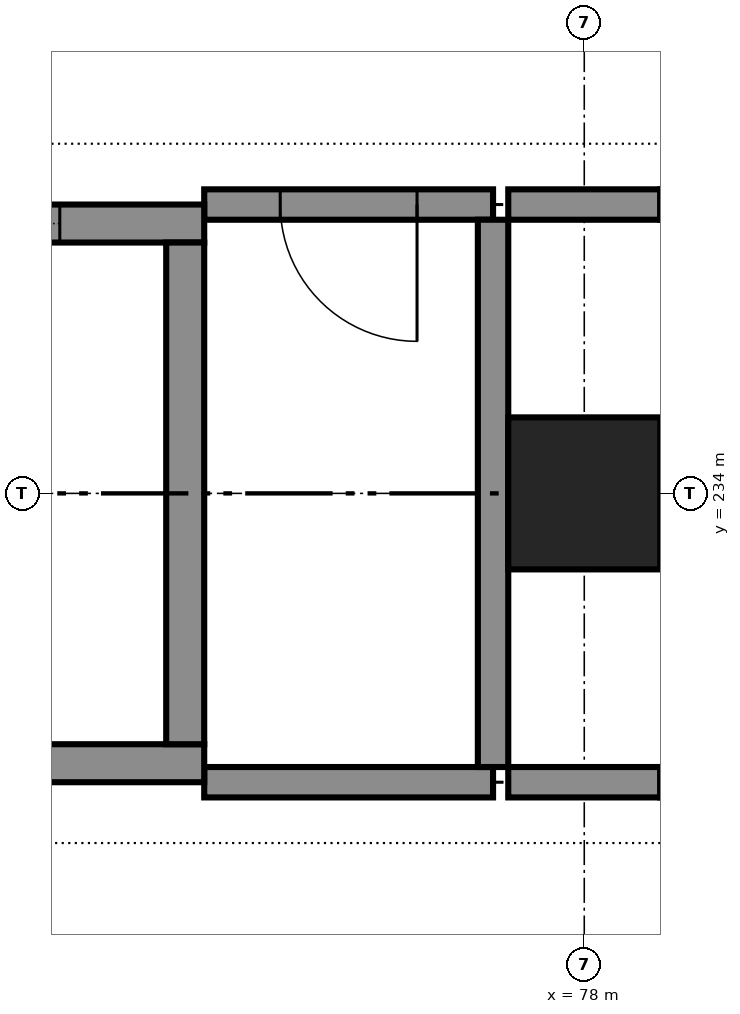
"""IFC4 building model, lengths in metres.
Left out: names, types, materials, properties, quantities, classifications, styles, units other than length and angle.
Written with IfcOpenShell. Run it as: python <this file> out.ifc"""

import sys

from ifc_helpers import new_model, si_unit, direction, frame, frame_2d, origin, origin_2d, place, context, subcontext, project, spatial, rectangle, extrude, element, fill, save


model = new_model("IFC4")
c1 = context("Model", 3, precision=1e-05, world=origin(), true_north=direction((0.0, 1.0)))
c2 = subcontext(c1, "Body", "Model", "MODEL_VIEW")
j1 = project(units=[si_unit("LENGTHUNIT", "METRE"), si_unit("PLANEANGLEUNIT", "RADIAN")], contexts=[c1])
p1 = place(None, origin())
s1 = spatial("IfcSite", under=j1, at=p1, CompositionType="ELEMENT")
p2 = place(p1, origin())
s2 = spatial("IfcBuilding", under=s1, at=p2, CompositionType="ELEMENT")
p3 = place(p2, frame((0.0, 0.0, 17.0)))
s3 = spatial("IfcBuildingStorey", under=s2, at=p3, CompositionType="ELEMENT", Elevation=17.0)
p4 = place(p3, frame((78.0, 234.0, 0.0), z_axis=(0.0, 0.0, 1.0), x_axis=(1.0, 0.0, 0.0)))
e1 = element("IfcColumn", 1, at=p4, inside=s3, PredefinedType="COLUMN", context=c2, shape_type="SweptSolid", body=[
    extrude(rectangle(XDim=1.0, YDim=1.0, at=origin_2d()), origin(), (0.0, 0.0, 1.0), 4.0),
])
p5 = place(p3, frame((72.5, 232.225, 0.0), z_axis=(0.0, 0.0, 1.0), x_axis=(1.0, 0.0, 0.0)))
e2 = element("IfcWall", 2, at=p5, inside=s3, PredefinedType="SHEAR", context=c2, shape_type="SweptSolid", body=[
    extrude(rectangle(XDim=3.0, YDim=0.25, at=frame_2d((1.5, 0.0))), origin(), (0.0, 0.0, 1.0), 4.0),
])
p6 = place(p3, frame((72.5, 235.775, 0.0), z_axis=(0.0, 0.0, 1.0), x_axis=(1.0, 0.0, 0.0)))
e3 = element("IfcWall", 3, at=p6, inside=s3, PredefinedType="SHEAR", context=c2, shape_type="SweptSolid", body=[
    extrude(rectangle(XDim=3.0, YDim=0.25, at=frame_2d((1.5, 0.0))), origin(), (0.0, 0.0, 1.0), 4.0),
])
p7 = place(p6, frame((0.95, 0.0, 0.0)))
e4 = element("IfcOpeningElement", 4, at=p7, cuts=e3, PredefinedType="OPENING", context=c2, shape_type="SweptSolid", body=[
    extrude(rectangle(XDim=1.1, YDim=2.1, at=frame_2d((0.55, 1.05))), frame((0.0, 0.135, 0.0), z_axis=(0.0, -1.0, 0.0), x_axis=(1.0, 0.0, 0.0)), (0.0, 0.0, 1.0), 0.27),
])
p8 = place(p3, frame((75.375, 232.35, 0.0), z_axis=(0.0, 0.0, 1.0), x_axis=(0.0, 1.0, 0.0)))
e5 = element("IfcWall", 5, at=p8, inside=s3, PredefinedType="SHEAR", context=c2, shape_type="SweptSolid", body=[
    extrude(rectangle(XDim=3.3, YDim=0.25, at=frame_2d((1.65, 0.0))), origin(), (0.0, 0.0, 1.0), 4.0),
])
p9 = place(p3, frame((75.5, 232.1, 0.0), z_axis=(0.0, 0.0, 1.0), x_axis=(1.0, 0.0, 0.0)))
e6 = element("IfcWall", 6, at=p9, inside=s3, PredefinedType="PARTITIONING", context=c2, shape_type="SweptSolid", body=[
    extrude(rectangle(XDim=1.9, YDim=0.2, at=frame_2d((0.95, 0.0))), origin(), (0.0, 0.0, 1.0), 3.8),
])
p10 = place(p3, frame((77.5, 232.1, 0.0), z_axis=(0.0, 0.0, 1.0), x_axis=(1.0, 0.0, 0.0)))
e7 = element("IfcWall", 7, at=p10, inside=s3, PredefinedType="PARTITIONING", context=c2, shape_type="SweptSolid", body=[
    extrude(rectangle(XDim=1.0, YDim=0.2, at=frame_2d((0.5, 0.0))), origin(), (0.0, 0.0, 1.0), 3.8),
])
p11 = place(p3, frame((77.4, 235.9, 0.0), z_axis=(0.0, 0.0, 1.0), x_axis=(-1.0, 0.0, 0.0)))
e8 = element("IfcWall", 8, at=p11, inside=s3, PredefinedType="PARTITIONING", context=c2, shape_type="SweptSolid", body=[
    extrude(rectangle(XDim=1.9, YDim=0.2, at=frame_2d((0.95, 0.0))), origin(), (0.0, 0.0, 1.0), 3.8),
])
p12 = place(p11, frame((0.5, 0.0, 0.0)))
e9 = element("IfcOpeningElement", 9, at=p12, cuts=e8, PredefinedType="OPENING", context=c2, shape_type="SweptSolid", body=[
    extrude(rectangle(XDim=0.9, YDim=2.1, at=frame_2d((0.45, 1.05))), frame((0.0, 0.11, 0.0), z_axis=(0.0, -1.0, 0.0), x_axis=(1.0, 0.0, 0.0)), (0.0, 0.0, 1.0), 0.22),
])
p13 = place(p3, frame((77.5, 235.9, 0.0), z_axis=(0.0, 0.0, 1.0), x_axis=(1.0, 0.0, 0.0)))
e10 = element("IfcWall", 10, at=p13, inside=s3, PredefinedType="PARTITIONING", context=c2, shape_type="SweptSolid", body=[
    extrude(rectangle(XDim=1.0, YDim=0.2, at=frame_2d((0.5, 0.0))), origin(), (0.0, 0.0, 1.0), 3.8),
])
p14 = place(p3, frame((77.4, 232.2, 0.0), z_axis=(0.0, 0.0, 1.0), x_axis=(0.0, 1.0, 0.0)))
e11 = element("IfcWall", 11, at=p14, inside=s3, PredefinedType="PARTITIONING", context=c2, shape_type="SweptSolid", body=[
    extrude(rectangle(XDim=3.6, YDim=0.2, at=frame_2d((1.8, 0.0))), origin(), (0.0, 0.0, 1.0), 3.8),
])
p15 = place(p12, origin())
e12 = element("IfcDoor", 12, at=p15, inside=s3, OperationType="SINGLE_SWING_LEFT", PredefinedType="DOOR", context=c2, shape_type="SweptSolid", body=[
    extrude(rectangle(XDim=0.9, YDim=2.1, at=frame_2d((0.45, 1.05))), frame((0.0, 0.025, 0.0), z_axis=(0.0, -1.0, 0.0), x_axis=(1.0, 0.0, 0.0)), (0.0, 0.0, 1.0), 0.05),
])
fill(e9, e12)
p16 = place(p7, origin())
e13 = element("IfcDoor", 13, at=p16, inside=s3, OperationType="SLIDING_TO_LEFT", PredefinedType="DOOR", context=c2, shape_type="SweptSolid", body=[
    extrude(rectangle(XDim=1.1, YDim=2.1, at=frame_2d((0.55, 1.05))), frame((0.0, 0.025, 0.0), z_axis=(0.0, -1.0, 0.0), x_axis=(1.0, 0.0, 0.0)), (0.0, 0.0, 1.0), 0.05),
])
fill(e4, e13)
save(model, sys.argv[1])
